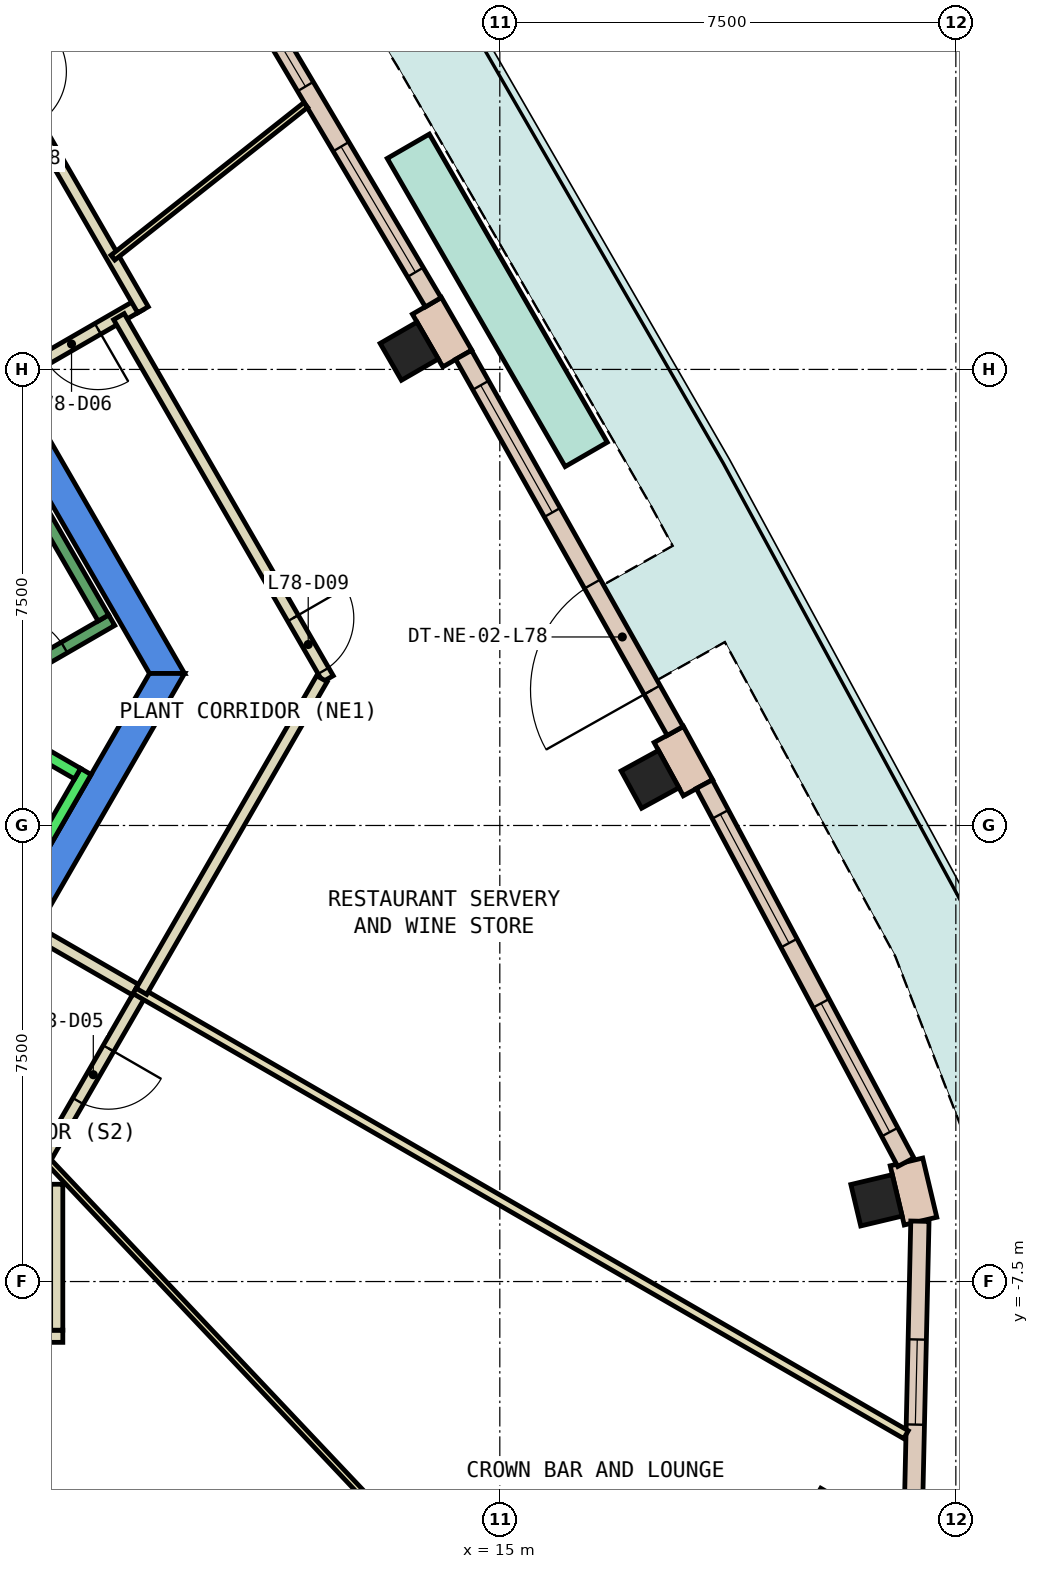
"""IFC4 building model, lengths in metres.
Left out: names, types, materials, properties, quantities, classifications, styles, units other than length and angle.
Written with IfcOpenShell. Run it as: python <this file> out.ifc"""

import sys

from ifc_helpers import new_model, si_unit, direction, frame, frame_2d, origin, origin_2d, place, context, subcontext, project, spatial, polyline, rectangle, outline, extrude, element, fill, save


model = new_model("IFC4")
c1 = context("Model", 3, precision=1e-05, world=origin(), true_north=direction((0.0, 1.0)))
c2 = subcontext(c1, "Body", "Model", "MODEL_VIEW")
j1 = project(units=[si_unit("LENGTHUNIT", "METRE"), si_unit("PLANEANGLEUNIT", "RADIAN")], contexts=[c1])
p1 = place(None, origin())
s1 = spatial("IfcSite", under=j1, at=p1, CompositionType="ELEMENT")
p2 = place(p1, origin())
s2 = spatial("IfcBuilding", under=s1, at=p2, CompositionType="ELEMENT")
p3 = place(p2, frame((0.0, 0.0, 331.4)))
s3 = spatial("IfcBuildingStorey", under=s2, at=p3, CompositionType="ELEMENT", Elevation=331.4)
p4 = place(p3, frame((20.535, -11.856, 0.0), z_axis=(0.0, 0.0, 1.0), x_axis=(-0.866025403784, 0.5, 0.0)))
e1 = element("IfcColumn", 1, at=p4, inside=s3, PredefinedType="COLUMN", context=c2, shape_type="SweptSolid", body=[
    extrude(rectangle(XDim=1.4, YDim=1.4, at=origin_2d()), origin(), (0.0, 0.0, 1.0), 4.15),
])
for number, where, z_axis, x_axis in (
    (2, (21.195, -6.164, 0.0), (0.0, 0.0, 1.0), (-0.232, 0.973, 0.0)),
    (3, (17.471, 0.759, 0.0), (0.0, 0.0, 1.0), (-0.48, 0.877, 0.0)),
    (4, (13.51, 7.8, 0.0), (0.0, 0.0, 1.0), (-0.5, 0.866, 0.0)),
):
    element("IfcColumn", number, at=place(p3, frame(where, z_axis=z_axis, x_axis=x_axis)), inside=s3, PredefinedType="COLUMN", context=c2, shape_type="SweptSolid", body=[
        extrude(rectangle(XDim=0.7, YDim=0.7, at=origin_2d()), origin(), (0.0, 0.0, 1.0), 4.15),
    ])
p5 = place(p3, frame((0.0, 0.0, -0.45)))
e5 = element("IfcWall", 5, at=p5, inside=s3, PredefinedType="SHEAR", context=c2, shape_type="SweptSolid", body=[
    extrude(outline(polyline([(5.486, 9.998), (5.053, 9.748), (9.238, 2.5), (9.815, 2.5), (5.486, 9.998)])), origin(), (0.0, 0.0, 1.0), 4.6),
])
p6 = place(p3, frame((0.0, 0.0, -0.45)))
e6 = element("IfcWall", 6, at=p6, inside=s3, PredefinedType="SHEAR", context=c2, shape_type="SweptSolid", body=[
    extrude(outline(polyline([(4.907, -6.0), (9.815, 2.5), (9.238, 2.5), (4.619, -5.5), (4.907, -6.0)])), origin(), (0.0, 0.0, 1.0), 4.6),
])
p7 = place(p3, frame((21.919, -6.506, 0.0), z_axis=(0.0, 0.0, 1.0), x_axis=(-0.230916459446, 0.972973580709, 0.0)))
e7 = element("IfcWall", 7, at=p7, inside=s3, PredefinedType="STANDARD", context=c2, shape_type="SweptSolid", body=[
    extrude(rectangle(XDim=1.0, YDim=0.55, at=frame_2d((0.5, 0.0))), origin(), (0.0, 0.0, 1.0), 4.15),
])
p8 = place(p3, frame((18.259, 0.62, 0.0), z_axis=(0.0, 0.0, 1.0), x_axis=(-0.480117793957, 0.877204026396, 0.0)))
e8 = element("IfcWall", 8, at=p8, inside=s3, PredefinedType="STANDARD", context=c2, shape_type="SweptSolid", body=[
    extrude(rectangle(XDim=1.0, YDim=0.55, at=frame_2d((0.5, 0.0))), origin(), (0.0, 0.0, 1.0), 4.15),
])
p9 = place(p3, frame((14.301, 7.679, 0.0), z_axis=(0.0, 0.0, 1.0), x_axis=(-0.49960277677, 0.866254619292, 0.0)))
e9 = element("IfcWall", 9, at=p9, inside=s3, PredefinedType="STANDARD", context=c2, shape_type="SweptSolid", body=[
    extrude(rectangle(XDim=1.001, YDim=0.55, at=frame_2d((0.5, 0.0))), origin(), (0.0, 0.0, 1.0), 4.15),
])
p10 = place(p3, frame((21.796, -11.546, 0.0), z_axis=(0.0, 0.0, 1.0), x_axis=(0.022431960078, 0.999748371925, 0.0)))
e10 = element("IfcWall", 10, at=p10, inside=s3, PredefinedType="STANDARD", context=c2, shape_type="SweptSolid", body=[
    extrude(rectangle(XDim=5.039, YDim=0.3, at=frame_2d((2.52, 0.0))), origin(), (0.0, 0.0, 1.0), 4.15),
])
p11 = place(p10, frame((1.694, 0.0, 0.9)))
e11 = element("IfcOpeningElement", 11, at=p11, cuts=e10, PredefinedType="OPENING", context=c2, shape_type="SweptSolid", body=[
    extrude(rectangle(XDim=1.4, YDim=3.0, at=frame_2d((0.7, 1.5))), frame((0.0, 0.16, 0.0), z_axis=(0.0, -1.0, 0.0), x_axis=(1.0, 0.0, 0.0)), (0.0, 0.0, 1.0), 0.32),
])
p12 = place(p3, frame((21.677, -5.537, 0.0), z_axis=(0.0, 0.0, 1.0), x_axis=(-0.470447918342, 0.882427762555, 0.0)))
e12 = element("IfcWall", 12, at=p12, inside=s3, PredefinedType="STANDARD", context=c2, shape_type="SweptSolid", body=[
    extrude(rectangle(XDim=7.044, YDim=0.3, at=frame_2d((3.522, 0.0))), origin(), (0.0, 0.0, 1.0), 4.15),
])
p13 = place(p12, frame((0.561, 0.0, 0.9)))
e13 = element("IfcOpeningElement", 13, at=p13, cuts=e12, PredefinedType="OPENING", context=c2, shape_type="SweptSolid", body=[
    extrude(rectangle(XDim=2.4, YDim=3.0, at=frame_2d((1.2, 1.5))), frame((0.0, 0.16, 0.0), z_axis=(0.0, -1.0, 0.0), x_axis=(1.0, 0.0, 0.0)), (0.0, 0.0, 1.0), 0.32),
])
p14 = place(p12, frame((4.083, 0.0, 0.9)))
e14 = element("IfcOpeningElement", 14, at=p14, cuts=e12, PredefinedType="OPENING", context=c2, shape_type="SweptSolid", body=[
    extrude(rectangle(XDim=2.4, YDim=3.0, at=frame_2d((1.2, 1.5))), frame((0.0, 0.16, 0.0), z_axis=(0.0, -1.0, 0.0), x_axis=(1.0, 0.0, 0.0)), (0.0, 0.0, 1.0), 0.32),
])
p15 = place(p3, frame((17.884, 1.554, 0.0), z_axis=(0.0, 0.0, 1.0), x_axis=(-0.49029716741, 0.871555326775, 0.0)))
e15 = element("IfcWall", 15, at=p15, inside=s3, PredefinedType="STANDARD", context=c2, shape_type="SweptSolid", body=[
    extrude(rectangle(XDim=7.098, YDim=0.3, at=frame_2d((3.549, 0.0))), origin(), (0.0, 0.0, 1.0), 4.15),
])
p16 = place(p15, frame((0.774, 0.0, 0.0)))
e16 = element("IfcOpeningElement", 16, at=p16, cuts=e15, PredefinedType="OPENING", context=c2, shape_type="SweptSolid", body=[
    extrude(rectangle(XDim=2.0, YDim=2.4, at=frame_2d((1.0, 1.2))), frame((0.0, 0.16, 0.0), z_axis=(0.0, -1.0, 0.0), x_axis=(1.0, 0.0, 0.0)), (0.0, 0.0, 1.0), 0.32),
])
p17 = place(p15, frame((4.123, 0.0, 0.9)))
e17 = element("IfcOpeningElement", 17, at=p17, cuts=e15, PredefinedType="OPENING", context=c2, shape_type="SweptSolid", body=[
    extrude(rectangle(XDim=2.4, YDim=3.0, at=frame_2d((1.2, 1.5))), frame((0.0, 0.16, 0.0), z_axis=(0.0, -1.0, 0.0), x_axis=(1.0, 0.0, 0.0)), (0.0, 0.0, 1.0), 0.32),
])
p18 = place(p3, frame((13.905, 8.604, 0.0), z_axis=(0.0, 0.0, 1.0), x_axis=(-0.509697735304, 0.86035354281, 0.0)))
e18 = element("IfcWall", 18, at=p18, inside=s3, PredefinedType="STANDARD", context=c2, shape_type="SweptSolid", body=[
    extrude(rectangle(XDim=7.098, YDim=0.3, at=frame_2d((3.549, 0.0))), origin(), (0.0, 0.0, 1.0), 4.15),
])
p19 = place(p18, frame((0.575, 0.0, 0.9)))
e19 = element("IfcOpeningElement", 19, at=p19, cuts=e18, PredefinedType="OPENING", context=c2, shape_type="SweptSolid", body=[
    extrude(rectangle(XDim=2.4, YDim=3.0, at=frame_2d((1.2, 1.5))), frame((0.0, 0.16, 0.0), z_axis=(0.0, -1.0, 0.0), x_axis=(1.0, 0.0, 0.0)), (0.0, 0.0, 1.0), 0.32),
])
p20 = place(p18, frame((4.124, 0.0, 0.9)))
e20 = element("IfcOpeningElement", 20, at=p20, cuts=e18, PredefinedType="OPENING", context=c2, shape_type="SweptSolid", body=[
    extrude(rectangle(XDim=2.4, YDim=3.0, at=frame_2d((1.2, 1.5))), frame((0.0, 0.16, 0.0), z_axis=(0.0, -1.0, 0.0), x_axis=(1.0, 0.0, 0.0)), (0.0, 0.0, 1.0), 0.32),
])
p21 = place(p3, frame((16.421, 6.102, 0.0), z_axis=(0.0, 0.0, 1.0), x_axis=(-0.499980071345, 0.866036909293, 0.0)))
e21 = element("IfcWall", 21, at=p21, inside=s3, PredefinedType="STANDARD", context=c2, shape_type="SweptSolid", body=[
    extrude(rectangle(XDim=5.852, YDim=0.8, at=frame_2d((2.926, 0.0))), origin(), (0.0, 0.0, 1.0), 0.8),
])
p22 = place(p3, frame((7.813, -8.4, 0.0), z_axis=(0.0, 0.0, 1.0), x_axis=(-1.0, 0.0, 0.0)))
e22 = element("IfcWall", 22, at=p22, inside=s3, PredefinedType="PARTITIONING", context=c2, shape_type="SweptSolid", body=[
    extrude(rectangle(XDim=5.671, YDim=0.2, at=frame_2d((2.835, 0.0))), origin(), (0.0, 0.0, 1.0), 4.15),
])
p23 = place(p22, frame((2.441, 0.0, 0.0)))
e23 = element("IfcOpeningElement", 23, at=p23, cuts=e22, PredefinedType="OPENING", context=c2, shape_type="SweptSolid", body=[
    extrude(rectangle(XDim=1.0, YDim=2.1, at=frame_2d((0.5, 1.05))), frame((0.0, 0.11, 0.0), z_axis=(0.0, -1.0, 0.0), x_axis=(1.0, 0.0, 0.0)), (0.0, 0.0, 1.0), 0.22),
])
p24 = place(p3, frame((7.713, -5.9, 0.0), z_axis=(0.0, 0.0, 1.0), x_axis=(0.0, -1.0, 0.0)))
e24 = element("IfcWall", 24, at=p24, inside=s3, PredefinedType="PARTITIONING", context=c2, shape_type="SweptSolid", body=[
    extrude(rectangle(XDim=2.4, YDim=0.2, at=frame_2d((1.2, 0.0))), origin(), (0.0, 0.0, 1.0), 4.15),
])
p25 = place(p3, frame((9.106, -2.728, 0.0), z_axis=(0.0, 0.0, 1.0), x_axis=(-0.500132879116, -0.865948672398, 0.0)))
e25 = element("IfcWall", 25, at=p25, inside=s3, PredefinedType="PARTITIONING", context=c2, shape_type="SweptSolid", body=[
    extrude(rectangle(XDim=3.879, YDim=0.2, at=frame_2d((1.939, 0.0))), origin(), (0.0, 0.0, 1.0), 4.15),
])
p26 = place(p25, frame((1.083, 0.0, 0.0)))
e26 = element("IfcOpeningElement", 26, at=p26, cuts=e25, PredefinedType="OPENING", context=c2, shape_type="SweptSolid", body=[
    extrude(rectangle(XDim=1.0, YDim=2.1, at=frame_2d((0.5, 1.05))), frame((0.0, 0.11, 0.0), z_axis=(0.0, -1.0, 0.0), x_axis=(1.0, 0.0, 0.0)), (0.0, 0.0, 1.0), 0.22),
])
p27 = place(p3, frame((7.361, -1.75, 0.0), z_axis=(0.0, 0.0, 1.0), x_axis=(0.865980106173, -0.500078449558, 0.0)))
e27 = element("IfcWall", 27, at=p27, inside=s3, PredefinedType="PARTITIONING", context=c2, shape_type="SweptSolid", body=[
    extrude(rectangle(XDim=1.9, YDim=0.2, at=frame_2d((0.95, 0.0))), origin(), (0.0, 0.0, 1.0), 4.15),
])
p28 = place(p3, frame((7.524, -5.467, 0.0), z_axis=(0.0, 0.0, 1.0), x_axis=(0.686666158826, -0.726972892427, 0.0)))
e28 = element("IfcWall", 28, at=p28, inside=s3, PredefinedType="PARTITIONING", context=c2, shape_type="SweptSolid", body=[
    extrude(rectangle(XDim=13.622, YDim=0.1, at=frame_2d((6.811, 0.0))), origin(), (0.0, 0.0, 1.0), 4.15),
])
p29 = place(p3, frame((9.006, -2.7, 0.0), z_axis=(0.0, 0.0, 1.0), x_axis=(0.865999449672, -0.500044951147, 0.0)))
e29 = element("IfcWall", 29, at=p29, inside=s3, PredefinedType="PARTITIONING", context=c2, shape_type="SweptSolid", body=[
    extrude(rectangle(XDim=14.635, YDim=0.15, at=frame_2d((7.317, 0.0))), origin(), (0.0, 0.0, 1.0), 4.15),
])
p30 = place(p3, frame((9.082, 8.568, 0.0), z_axis=(0.0, 0.0, 1.0), x_axis=(-0.865955154139, -0.50012165622, 0.0)))
e30 = element("IfcWall", 30, at=p30, inside=s3, PredefinedType="PARTITIONING", context=c2, shape_type="SweptSolid", body=[
    extrude(rectangle(XDim=2.4, YDim=0.2, at=frame_2d((1.2, 0.0))), origin(), (0.0, 0.0, 1.0), 4.15),
])
p31 = place(p30, frame((0.8, 0.0, 0.0)))
e31 = element("IfcOpeningElement", 31, at=p31, cuts=e30, PredefinedType="OPENING", context=c2, shape_type="SweptSolid", body=[
    extrude(rectangle(XDim=1.0, YDim=2.1, at=frame_2d((0.5, 1.05))), frame((0.0, 0.11, 0.0), z_axis=(0.0, -1.0, 0.0), x_axis=(1.0, 0.0, 0.0)), (0.0, 0.0, 1.0), 0.22),
])
p32 = place(p3, frame((5.532, 14.717, 0.0), z_axis=(0.0, 0.0, 1.0), x_axis=(0.499968011863, -0.866043871356, 0.0)))
e32 = element("IfcWall", 32, at=p32, inside=s3, PredefinedType="PARTITIONING", context=c2, shape_type="SweptSolid", body=[
    extrude(rectangle(XDim=7.201, YDim=0.2, at=frame_2d((3.6, 0.0))), origin(), (0.0, 0.0, 1.0), 4.15),
])
p33 = place(p32, frame((2.68, 0.0, 0.0)))
e33 = element("IfcOpeningElement", 33, at=p33, cuts=e32, PredefinedType="OPENING", context=c2, shape_type="SweptSolid", body=[
    extrude(rectangle(XDim=1.0, YDim=2.1, at=frame_2d((0.5, 1.05))), frame((0.0, 0.11, 0.0), z_axis=(0.0, -1.0, 0.0), x_axis=(1.0, 0.0, 0.0)), (0.0, 0.0, 1.0), 0.22),
])
p34 = place(p3, frame((8.736, 8.368, 0.0), z_axis=(0.0, 0.0, 1.0), x_axis=(0.499995994493, -0.866027716353, 0.0)))
e34 = element("IfcWall", 34, at=p34, inside=s3, PredefinedType="PARTITIONING", context=c2, shape_type="SweptSolid", body=[
    extrude(rectangle(XDim=6.876, YDim=0.2, at=frame_2d((3.438, 0.0))), origin(), (0.0, 0.0, 1.0), 4.15),
])
p35 = place(p34, frame((5.726, 0.0, 0.0)))
e35 = element("IfcOpeningElement", 35, at=p35, cuts=e34, PredefinedType="OPENING", context=c2, shape_type="SweptSolid", body=[
    extrude(rectangle(XDim=1.0, YDim=2.1, at=frame_2d((0.5, 1.05))), frame((0.0, 0.11, 0.0), z_axis=(0.0, -1.0, 0.0), x_axis=(1.0, 0.0, 0.0)), (0.0, 0.0, 1.0), 0.22),
])
p36 = place(p3, frame((12.074, 2.413, 0.0), z_axis=(0.0, 0.0, 1.0), x_axis=(-0.499974029402, -0.866040397397, 0.0)))
e36 = element("IfcWall", 36, at=p36, inside=s3, PredefinedType="PARTITIONING", context=c2, shape_type="SweptSolid", body=[
    extrude(rectangle(XDim=5.936, YDim=0.2, at=frame_2d((2.968, 0.0))), origin(), (0.0, 0.0, 1.0), 4.15),
])
p37 = place(p3, frame((11.808, 11.849, 0.0), z_axis=(0.0, 0.0, 1.0), x_axis=(-0.784103353093, -0.620630269701, 0.0)))
e37 = element("IfcWall", 37, at=p37, inside=s3, PredefinedType="PARTITIONING", context=c2, shape_type="SweptSolid", body=[
    extrude(rectangle(XDim=4.044, YDim=0.1, at=frame_2d((2.022, 0.0))), origin(), (0.0, 0.0, 1.0), 4.15),
])
p38 = place(p3, frame((5.492, -3.788, 0.0), z_axis=(0.0, 0.0, 1.0), x_axis=(0.500034260056, 0.866005622828, 0.0)))
e38 = element("IfcWall", 38, at=p38, inside=s3, PredefinedType="STANDARD", context=c2, shape_type="SweptSolid", body=[
    extrude(rectangle(XDim=5.399, YDim=0.2, at=frame_2d((2.7, 0.0))), origin(), (0.0, 0.0, 1.0), 4.15),
])
p39 = place(p3, frame((5.977, 2.052, 0.0), z_axis=(0.0, 0.0, 1.0), x_axis=(0.865973769406, -0.500089422704, 0.0)))
e39 = element("IfcWall", 39, at=p39, inside=s3, PredefinedType="STANDARD", context=c2, shape_type="SweptSolid", body=[
    extrude(rectangle(XDim=2.399, YDim=0.2, at=frame_2d((1.2, 0.0))), origin(), (0.0, 0.0, 1.0), 4.15),
])
p40 = place(p3, frame((4.806, 1.176, 0.0), z_axis=(0.0, 0.0, 1.0), x_axis=(0.866059941101, 0.499940174841, 0.0)))
e40 = element("IfcWall", 40, at=p40, inside=s3, PredefinedType="STANDARD", context=c2, shape_type="SweptSolid", body=[
    extrude(rectangle(XDim=4.4, YDim=0.2, at=frame_2d((2.2, 0.0))), origin(), (0.0, 0.0, 1.0), 4.15),
])
p41 = place(p40, frame((2.4, 0.0, 0.0)))
e41 = element("IfcOpeningElement", 41, at=p41, cuts=e40, PredefinedType="OPENING", context=c2, shape_type="SweptSolid", body=[
    extrude(rectangle(XDim=1.1, YDim=2.2, at=frame_2d((0.55, 1.1))), frame((0.0, 0.11, 0.0), z_axis=(0.0, -1.0, 0.0), x_axis=(1.0, 0.0, 0.0)), (0.0, 0.0, 1.0), 0.22),
])
p42 = place(p3, frame((8.48, 3.412, 0.0), z_axis=(0.0, 0.0, 1.0), x_axis=(-0.499978703459, 0.866037698999, 0.0)))
e42 = element("IfcWall", 42, at=p42, inside=s3, PredefinedType="STANDARD", context=c2, shape_type="SweptSolid", body=[
    extrude(rectangle(XDim=6.9, YDim=0.2, at=frame_2d((3.45, 0.0))), origin(), (0.0, 0.0, 1.0), 4.15),
])
p43 = place(p11, origin())
e43 = element("IfcWindow", 43, at=p43, inside=s3, PartitioningType="SINGLE_PANEL", PredefinedType="WINDOW", context=c2, shape_type="SweptSolid", body=[
    extrude(rectangle(XDim=1.4, YDim=3.0, at=frame_2d((0.7, 1.5))), frame((0.0, 0.03, 0.0), z_axis=(0.0, -1.0, 0.0), x_axis=(1.0, 0.0, 0.0)), (0.0, 0.0, 1.0), 0.06),
])
fill(e11, e43)
p44 = place(p13, origin())
e44 = element("IfcWindow", 44, at=p44, inside=s3, PartitioningType="SINGLE_PANEL", PredefinedType="WINDOW", context=c2, shape_type="SweptSolid", body=[
    extrude(rectangle(XDim=2.4, YDim=3.0, at=frame_2d((1.2, 1.5))), frame((0.0, 0.03, 0.0), z_axis=(0.0, -1.0, 0.0), x_axis=(1.0, 0.0, 0.0)), (0.0, 0.0, 1.0), 0.06),
])
fill(e13, e44)
p45 = place(p14, origin())
e45 = element("IfcWindow", 45, at=p45, inside=s3, PartitioningType="SINGLE_PANEL", PredefinedType="WINDOW", context=c2, shape_type="SweptSolid", body=[
    extrude(rectangle(XDim=2.4, YDim=3.0, at=frame_2d((1.2, 1.5))), frame((0.0, 0.03, 0.0), z_axis=(0.0, -1.0, 0.0), x_axis=(1.0, 0.0, 0.0)), (0.0, 0.0, 1.0), 0.06),
])
fill(e14, e45)
p46 = place(p16, origin())
e46 = element("IfcDoor", 46, at=p46, inside=s3, OperationType="SLIDING_TO_LEFT", PredefinedType="DOOR", context=c2, shape_type="SweptSolid", body=[
    extrude(rectangle(XDim=2.0, YDim=2.4, at=frame_2d((1.0, 1.2))), frame((0.0, 0.025, 0.0), z_axis=(0.0, -1.0, 0.0), x_axis=(1.0, 0.0, 0.0)), (0.0, 0.0, 1.0), 0.05),
])
fill(e16, e46)
p47 = place(p17, origin())
e47 = element("IfcWindow", 47, at=p47, inside=s3, PartitioningType="SINGLE_PANEL", PredefinedType="WINDOW", context=c2, shape_type="SweptSolid", body=[
    extrude(rectangle(XDim=2.4, YDim=3.0, at=frame_2d((1.2, 1.5))), frame((0.0, 0.03, 0.0), z_axis=(0.0, -1.0, 0.0), x_axis=(1.0, 0.0, 0.0)), (0.0, 0.0, 1.0), 0.06),
])
fill(e17, e47)
p48 = place(p19, origin())
e48 = element("IfcWindow", 48, at=p48, inside=s3, PartitioningType="SINGLE_PANEL", PredefinedType="WINDOW", context=c2, shape_type="SweptSolid", body=[
    extrude(rectangle(XDim=2.4, YDim=3.0, at=frame_2d((1.2, 1.5))), frame((0.0, 0.03, 0.0), z_axis=(0.0, -1.0, 0.0), x_axis=(1.0, 0.0, 0.0)), (0.0, 0.0, 1.0), 0.06),
])
fill(e19, e48)
p49 = place(p20, origin())
e49 = element("IfcWindow", 49, at=p49, inside=s3, PartitioningType="SINGLE_PANEL", PredefinedType="WINDOW", context=c2, shape_type="SweptSolid", body=[
    extrude(rectangle(XDim=2.4, YDim=3.0, at=frame_2d((1.2, 1.5))), frame((0.0, 0.03, 0.0), z_axis=(0.0, -1.0, 0.0), x_axis=(1.0, 0.0, 0.0)), (0.0, 0.0, 1.0), 0.06),
])
fill(e20, e49)
p50 = place(p26, origin())
e50 = element("IfcDoor", 50, at=p50, inside=s3, OperationType="SINGLE_SWING_LEFT", PredefinedType="DOOR", context=c2, shape_type="SweptSolid", body=[
    extrude(rectangle(XDim=1.0, YDim=2.1, at=frame_2d((0.5, 1.05))), frame((0.0, 0.025, 0.0), z_axis=(0.0, -1.0, 0.0), x_axis=(1.0, 0.0, 0.0)), (0.0, 0.0, 1.0), 0.05),
])
fill(e26, e50)
p51 = place(p31, origin())
e51 = element("IfcDoor", 51, at=p51, inside=s3, OperationType="SINGLE_SWING_LEFT", PredefinedType="DOOR", context=c2, shape_type="SweptSolid", body=[
    extrude(rectangle(XDim=1.0, YDim=2.1, at=frame_2d((0.5, 1.05))), frame((0.0, 0.025, 0.0), z_axis=(0.0, -1.0, 0.0), x_axis=(1.0, 0.0, 0.0)), (0.0, 0.0, 1.0), 0.05),
])
fill(e31, e51)
p52 = place(p35, origin())
e52 = element("IfcDoor", 52, at=p52, inside=s3, OperationType="SINGLE_SWING_RIGHT", PredefinedType="DOOR", context=c2, shape_type="SweptSolid", body=[
    extrude(rectangle(XDim=1.0, YDim=2.1, at=frame_2d((0.5, 1.05))), frame((0.0, 0.025, 0.0), z_axis=(0.0, -1.0, 0.0), x_axis=(1.0, 0.0, 0.0)), (0.0, 0.0, 1.0), 0.05),
])
fill(e35, e52)
p53 = place(p41, origin())
e53 = element("IfcDoor", 53, at=p53, inside=s3, OperationType="SINGLE_SWING_LEFT", PredefinedType="DOOR", context=c2, shape_type="SweptSolid", body=[
    extrude(rectangle(XDim=1.1, YDim=2.2, at=frame_2d((0.55, 1.1))), frame((0.0, 0.025, 0.0), z_axis=(0.0, -1.0, 0.0), x_axis=(1.0, 0.0, 0.0)), (0.0, 0.0, 1.0), 0.05),
])
fill(e41, e53)
save(model, sys.argv[1])
